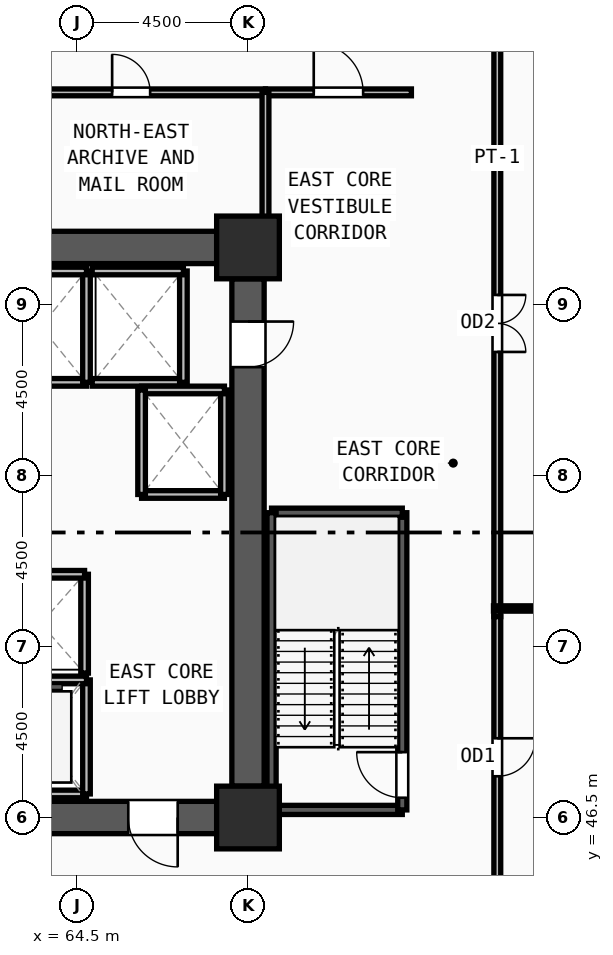
"""IFC4 building model, lengths in metres.
Left out: names, types, materials, properties, quantities, classifications, styles, units other than length and angle.
Written with IfcOpenShell. Run it as: python <this file> out.ifc"""

import sys

from ifc_helpers import new_model, si_unit, direction, frame, frame_2d, origin, origin_2d, place, context, subcontext, project, spatial, rectangle, extrude, source, transform, mapped, element, fill, save


model = new_model("IFC4")
c1 = context("Model", 3, precision=1e-05, world=origin(), true_north=direction((0.0, 1.0)))
c2 = subcontext(c1, "Body", "Model", "MODEL_VIEW")
j1 = project(units=[si_unit("LENGTHUNIT", "METRE"), si_unit("PLANEANGLEUNIT", "RADIAN")], contexts=[c1])
p1 = place(None, origin())
s1 = spatial("IfcSite", under=j1, at=p1, CompositionType="ELEMENT")
p2 = place(p1, origin())
s2 = spatial("IfcBuilding", under=s1, at=p2, CompositionType="ELEMENT")
p3 = place(p2, frame((0.0, 0.0, 28.5)))
s3 = spatial("IfcBuildingStorey", under=s2, at=p3, CompositionType="ELEMENT", Elevation=28.5)
m1 = source(origin(), c2, "Body", "SweptSolid", [
    extrude(rectangle(XDim=1.65, YDim=1.65, at=origin_2d()), origin(), (0.0, 0.0, 1.0), 3.75),
])
for number, where, z_axis, x_axis in (
    (1, (69.0, 46.5, 0.0), (0.0, 0.0, 1.0), (1.0, 0.0, 0.0)),
    (2, (69.0, 61.5, 0.0), (0.0, 0.0, 1.0), (1.0, 0.0, 0.0)),
):
    element("IfcColumn", number, at=place(p3, frame(where, z_axis=z_axis, x_axis=x_axis)), inside=s3, PredefinedType="COLUMN", context=c2, shape_type="MappedRepresentation", body=[
        mapped(m1, transform((0.0, 0.0, 0.0), x_axis=(1.0, 0.0, 0.0), y_axis=(0.0, 1.0, 0.0), z_axis=(0.0, 0.0, 1.0), scale=1.0)),
    ])
p4 = place(p3, frame((60.825, 61.5, 0.0), z_axis=(0.0, 0.0, 1.0), x_axis=(1.0, 0.0, 0.0)))
e3 = element("IfcWall", 3, at=p4, inside=s3, PredefinedType="SHEAR", context=c2, shape_type="SweptSolid", body=[
    extrude(rectangle(XDim=7.35, YDim=0.85, at=frame_2d((3.675, 0.0))), origin(), (0.0, 0.0, 1.0), 3.57),
])
p5 = place(p3, frame((69.0, 60.675, 0.0), z_axis=(0.0, 0.0, 1.0), x_axis=(0.0, -1.0, 0.0)))
e4 = element("IfcWall", 4, at=p5, inside=s3, PredefinedType="SHEAR", context=c2, shape_type="SweptSolid", body=[
    extrude(rectangle(XDim=13.35, YDim=0.85, at=frame_2d((6.675, 0.0))), origin(), (0.0, 0.0, 1.0), 3.57),
])
m2 = source(origin(), c2, "Body", "SweptSolid", [
    extrude(rectangle(XDim=1.2, YDim=2.2, at=frame_2d((0.6, 1.1))), frame((0.0, 0.435, 0.0), z_axis=(0.0, -1.0, 0.0), x_axis=(1.0, 0.0, 0.0)), (0.0, 0.0, 1.0), 0.87),
])
p6 = place(p5, frame((1.125, 0.0, 0.0)))
e5 = element("IfcOpeningElement", 5, at=p6, cuts=e4, PredefinedType="OPENING", context=c2, shape_type="MappedRepresentation", body=[
    mapped(m2, transform((0.0, 0.0, 0.0), x_axis=(1.0, 0.0, 0.0), y_axis=(0.0, 1.0, 0.0), z_axis=(0.0, 0.0, 1.0), scale=1.0)),
])
p7 = place(p3, frame((68.175, 46.5, 0.0), z_axis=(0.0, 0.0, 1.0), x_axis=(-1.0, 0.0, 0.0)))
e6 = element("IfcWall", 6, at=p7, inside=s3, PredefinedType="SHEAR", context=c2, shape_type="SweptSolid", body=[
    extrude(rectangle(XDim=7.35, YDim=0.85, at=frame_2d((3.675, 0.0))), origin(), (0.0, 0.0, 1.0), 3.57),
])
m3 = source(origin(), c2, "Body", "SweptSolid", [
    extrude(rectangle(XDim=1.3, YDim=2.2, at=frame_2d((0.65, 1.1))), frame((0.0, 0.435, 0.0), z_axis=(0.0, -1.0, 0.0), x_axis=(1.0, 0.0, 0.0)), (0.0, 0.0, 1.0), 0.87),
])
p8 = place(p7, frame((1.025, 0.0, 0.0)))
e7 = element("IfcOpeningElement", 7, at=p8, cuts=e6, PredefinedType="OPENING", context=c2, shape_type="MappedRepresentation", body=[
    mapped(m3, transform((0.0, 0.0, 0.0), x_axis=(1.0, 0.0, 0.0), y_axis=(0.0, 1.0, 0.0), z_axis=(0.0, 0.0, 1.0), scale=1.0)),
])
p9 = place(p3, frame((69.62, 46.7, 0.0), z_axis=(0.0, 0.0, 1.0), x_axis=(1.0, 0.0, 0.0)))
e8 = element("IfcWall", 8, at=p9, inside=s3, PredefinedType="SOLIDWALL", context=c2, shape_type="SweptSolid", body=[
    extrude(rectangle(XDim=3.44, YDim=0.24, at=frame_2d((1.72, 0.0))), origin(), (0.0, 0.0, 1.0), 3.57),
])
p10 = place(p3, frame((73.06, 46.7, 0.0), z_axis=(0.0, 0.0, 1.0), x_axis=(0.0, 1.0, 0.0)))
e9 = element("IfcWall", 9, at=p10, inside=s3, PredefinedType="SOLIDWALL", context=c2, shape_type="SweptSolid", body=[
    extrude(rectangle(XDim=7.82, YDim=0.24, at=frame_2d((3.91, 0.0))), origin(), (0.0, 0.0, 1.0), 3.57),
])
m4 = source(origin(), c2, "Body", "SweptSolid", [
    extrude(rectangle(XDim=1.2, YDim=2.2, at=frame_2d((0.6, 1.1))), frame((0.0, 0.13, 0.0), z_axis=(0.0, -1.0, 0.0), x_axis=(1.0, 0.0, 0.0)), (0.0, 0.0, 1.0), 0.26),
])
p11 = place(p10, frame((0.32, 0.0, 0.0)))
e10 = element("IfcOpeningElement", 10, at=p11, cuts=e9, PredefinedType="OPENING", context=c2, shape_type="MappedRepresentation", body=[
    mapped(m4, transform((0.0, 0.0, 0.0), x_axis=(1.0, 0.0, 0.0), y_axis=(0.0, 1.0, 0.0), z_axis=(0.0, 0.0, 1.0), scale=1.0)),
])
p12 = place(p3, frame((73.06, 54.52, 0.0), z_axis=(0.0, 0.0, 1.0), x_axis=(-1.0, 0.0, 0.0)))
e11 = element("IfcWall", 11, at=p12, inside=s3, PredefinedType="SOLIDWALL", context=c2, shape_type="SweptSolid", body=[
    extrude(rectangle(XDim=3.44, YDim=0.24, at=frame_2d((1.72, 0.0))), origin(), (0.0, 0.0, 1.0), 3.57),
])
p13 = place(p3, frame((69.62, 54.52, 0.0), z_axis=(0.0, 0.0, 1.0), x_axis=(0.0, -1.0, 0.0)))
e12 = element("IfcWall", 12, at=p13, inside=s3, PredefinedType="SOLIDWALL", context=c2, shape_type="SweptSolid", body=[
    extrude(rectangle(XDim=7.82, YDim=0.24, at=frame_2d((3.91, 0.0))), origin(), (0.0, 0.0, 1.0), 3.57),
])
p14 = place(p3, frame((62.35, 47.12, 0.0), z_axis=(0.0, 0.0, 1.0), x_axis=(1.0, 0.0, 0.0)))
e13 = element("IfcWall", 13, at=p14, inside=s3, PredefinedType="SOLIDWALL", context=c2, shape_type="SweptSolid", body=[
    extrude(rectangle(XDim=2.4, YDim=0.2, at=frame_2d((1.2, 0.0))), origin(), (0.0, 0.0, 1.0), 3.57),
])
p15 = place(p3, frame((64.75, 47.12, 0.0), z_axis=(0.0, 0.0, 1.0), x_axis=(0.0, 1.0, 0.0)))
e14 = element("IfcWall", 14, at=p15, inside=s3, PredefinedType="SOLIDWALL", context=c2, shape_type="SweptSolid", body=[
    extrude(rectangle(XDim=3.0, YDim=0.2, at=frame_2d((1.5, 0.0))), origin(), (0.0, 0.0, 1.0), 3.57),
])
for number, where, z_axis, x_axis in (
    (15, (64.75, 50.12, 0.0), (0.0, 0.0, 1.0), (-1.0, 0.0, 0.0)),
    (16, (62.35, 57.95, 0.0), (0.0, 0.0, 1.0), (1.0, 0.0, 0.0)),
):
    element("IfcWall", number, at=place(p3, frame(where, z_axis=z_axis, x_axis=x_axis)), inside=s3, PredefinedType="SOLIDWALL", context=c2, shape_type="SweptSolid", body=[
        extrude(rectangle(XDim=2.4, YDim=0.2, at=frame_2d((1.2, 0.0))), origin(), (0.0, 0.0, 1.0), 3.57),
    ])
p16 = place(p3, frame((64.75, 57.95, 0.0), z_axis=(0.0, 0.0, 1.0), x_axis=(0.0, 1.0, 0.0)))
e17 = element("IfcWall", 17, at=p16, inside=s3, PredefinedType="SOLIDWALL", context=c2, shape_type="SweptSolid", body=[
    extrude(rectangle(XDim=2.93, YDim=0.2, at=frame_2d((1.465, 0.0))), origin(), (0.0, 0.0, 1.0), 3.57),
])
p17 = place(p3, frame((64.75, 60.88, 0.0), z_axis=(0.0, 0.0, 1.0), x_axis=(-1.0, 0.0, 0.0)))
e18 = element("IfcWall", 18, at=p17, inside=s3, PredefinedType="SOLIDWALL", context=c2, shape_type="SweptSolid", body=[
    extrude(rectangle(XDim=2.4, YDim=0.2, at=frame_2d((1.2, 0.0))), origin(), (0.0, 0.0, 1.0), 3.57),
])
p18 = place(p3, frame((64.9, 57.95, 0.0), z_axis=(0.0, 0.0, 1.0), x_axis=(1.0, 0.0, 0.0)))
e19 = element("IfcWall", 19, at=p18, inside=s3, PredefinedType="SOLIDWALL", context=c2, shape_type="SweptSolid", body=[
    extrude(rectangle(XDim=2.4, YDim=0.2, at=frame_2d((1.2, 0.0))), origin(), (0.0, 0.0, 1.0), 3.57),
])
p19 = place(p3, frame((67.3, 57.95, 0.0), z_axis=(0.0, 0.0, 1.0), x_axis=(0.0, 1.0, 0.0)))
e20 = element("IfcWall", 20, at=p19, inside=s3, PredefinedType="SOLIDWALL", context=c2, shape_type="SweptSolid", body=[
    extrude(rectangle(XDim=2.93, YDim=0.2, at=frame_2d((1.465, 0.0))), origin(), (0.0, 0.0, 1.0), 3.57),
])
p20 = place(p3, frame((67.3, 60.88, 0.0), z_axis=(0.0, 0.0, 1.0), x_axis=(-1.0, 0.0, 0.0)))
e21 = element("IfcWall", 21, at=p20, inside=s3, PredefinedType="SOLIDWALL", context=c2, shape_type="SweptSolid", body=[
    extrude(rectangle(XDim=2.4, YDim=0.2, at=frame_2d((1.2, 0.0))), origin(), (0.0, 0.0, 1.0), 3.57),
])
p21 = place(p3, frame((66.2, 55.0, 0.0), z_axis=(0.0, 0.0, 1.0), x_axis=(1.0, 0.0, 0.0)))
e22 = element("IfcWall", 22, at=p21, inside=s3, PredefinedType="SOLIDWALL", context=c2, shape_type="SweptSolid", body=[
    extrude(rectangle(XDim=2.18, YDim=0.2, at=frame_2d((1.09, 0.0))), origin(), (0.0, 0.0, 1.0), 3.57),
])
p22 = place(p3, frame((68.38, 55.0, 0.0), z_axis=(0.0, 0.0, 1.0), x_axis=(0.0, 1.0, 0.0)))
e23 = element("IfcWall", 23, at=p22, inside=s3, PredefinedType="SOLIDWALL", context=c2, shape_type="SweptSolid", body=[
    extrude(rectangle(XDim=2.75, YDim=0.2, at=frame_2d((1.375, 0.0))), origin(), (0.0, 0.0, 1.0), 3.57),
])
p23 = place(p3, frame((68.38, 57.75, 0.0), z_axis=(0.0, 0.0, 1.0), x_axis=(-1.0, 0.0, 0.0)))
e24 = element("IfcWall", 24, at=p23, inside=s3, PredefinedType="SOLIDWALL", context=c2, shape_type="SweptSolid", body=[
    extrude(rectangle(XDim=2.18, YDim=0.2, at=frame_2d((1.09, 0.0))), origin(), (0.0, 0.0, 1.0), 3.57),
])
p24 = place(p3, frame((66.2, 57.75, 0.0), z_axis=(0.0, 0.0, 1.0), x_axis=(0.0, -1.0, 0.0)))
e25 = element("IfcWall", 25, at=p24, inside=s3, PredefinedType="SOLIDWALL", context=c2, shape_type="SweptSolid", body=[
    extrude(rectangle(XDim=2.75, YDim=0.2, at=frame_2d((1.375, 0.0))), origin(), (0.0, 0.0, 1.0), 3.57),
])
p25 = place(p3, frame((64.7, 50.3, 0.0), z_axis=(0.0, 0.0, 1.0), x_axis=(0.0, 1.0, 0.0)))
e26 = element("IfcWall", 26, at=p25, inside=s3, PredefinedType="SOLIDWALL", context=c2, shape_type="SweptSolid", body=[
    extrude(rectangle(XDim=2.6, YDim=0.2, at=frame_2d((1.3, 0.0))), origin(), (0.0, 0.0, 1.0), 3.57),
])
p26 = place(p3, frame((64.7, 52.9, 0.0), z_axis=(0.0, 0.0, 1.0), x_axis=(-1.0, 0.0, 0.0)))
e27 = element("IfcWall", 27, at=p26, inside=s3, PredefinedType="SOLIDWALL", context=c2, shape_type="SweptSolid", body=[
    extrude(rectangle(XDim=2.3, YDim=0.2, at=frame_2d((1.15, 0.0))), origin(), (0.0, 0.0, 1.0), 3.57),
])
p27 = place(p3, frame((62.39, 65.58, 0.0), z_axis=(0.0, 0.0, 1.0), x_axis=(1.0, 0.0, 0.0)))
e28 = element("IfcWall", 28, at=p27, inside=s3, PredefinedType="PARTITIONING", context=c2, shape_type="SweptSolid", body=[
    extrude(rectangle(XDim=7.07, YDim=0.18, at=frame_2d((3.535, 0.0))), origin(), (0.0, 0.0, 1.0), 3.57),
])
m5 = source(origin(), c2, "Body", "SweptSolid", [
    extrude(rectangle(XDim=1.0, YDim=2.2, at=frame_2d((0.5, 1.1))), frame((0.0, 0.1, 0.0), z_axis=(0.0, -1.0, 0.0), x_axis=(1.0, 0.0, 0.0)), (0.0, 0.0, 1.0), 0.2),
])
p28 = place(p27, frame((3.035, 0.0, 0.0)))
e29 = element("IfcOpeningElement", 29, at=p28, cuts=e28, PredefinedType="OPENING", context=c2, shape_type="MappedRepresentation", body=[
    mapped(m5, transform((0.0, 0.0, 0.0), x_axis=(1.0, 0.0, 0.0), y_axis=(0.0, 1.0, 0.0), z_axis=(0.0, 0.0, 1.0), scale=1.0)),
])
p29 = place(p3, frame((69.46, 65.58, 0.0), z_axis=(0.0, 0.0, 1.0), x_axis=(1.0, 0.0, 0.0)))
e30 = element("IfcWall", 30, at=p29, inside=s3, PredefinedType="PARTITIONING", context=c2, shape_type="SweptSolid", body=[
    extrude(rectangle(XDim=3.84, YDim=0.18, at=frame_2d((1.92, 0.0))), origin(), (0.0, 0.0, 1.0), 3.57),
])
m6 = source(origin(), c2, "Body", "SweptSolid", [
    extrude(rectangle(XDim=1.3, YDim=2.2, at=frame_2d((0.65, 1.1))), frame((0.0, 0.1, 0.0), z_axis=(0.0, -1.0, 0.0), x_axis=(1.0, 0.0, 0.0)), (0.0, 0.0, 1.0), 0.2),
])
p30 = place(p29, frame((1.27, 0.0, 0.0)))
e31 = element("IfcOpeningElement", 31, at=p30, cuts=e30, PredefinedType="OPENING", context=c2, shape_type="MappedRepresentation", body=[
    mapped(m6, transform((0.0, 0.0, 0.0), x_axis=(1.0, 0.0, 0.0), y_axis=(0.0, 1.0, 0.0), z_axis=(0.0, 0.0, 1.0), scale=1.0)),
])
p31 = place(p3, frame((75.56, 67.215, 0.0), z_axis=(0.0, 0.0, 1.0), x_axis=(0.0, -1.0, 0.0)))
e32 = element("IfcWall", 32, at=p31, inside=s3, PredefinedType="PARTITIONING", context=c2, shape_type="SweptSolid", body=[
    extrude(rectangle(XDim=15.43, YDim=0.18, at=frame_2d((7.715, 0.0))), origin(), (0.0, 0.0, 1.0), 3.57),
])
m7 = source(origin(), c2, "Body", "SweptSolid", [
    extrude(rectangle(XDim=1.5, YDim=2.2, at=frame_2d((0.75, 1.1))), frame((0.0, 0.1, 0.0), z_axis=(0.0, -1.0, 0.0), x_axis=(1.0, 0.0, 0.0)), (0.0, 0.0, 1.0), 0.2),
])
p32 = place(p31, frame((6.965, 0.0, 0.0)))
e33 = element("IfcOpeningElement", 33, at=p32, cuts=e32, PredefinedType="OPENING", context=c2, shape_type="MappedRepresentation", body=[
    mapped(m7, transform((0.0, 0.0, 0.0), x_axis=(1.0, 0.0, 0.0), y_axis=(0.0, 1.0, 0.0), z_axis=(0.0, 0.0, 1.0), scale=1.0)),
])
p33 = place(p3, frame((75.56, 51.785, 0.0), z_axis=(0.0, 0.0, 1.0), x_axis=(0.0, -1.0, 0.0)))
e34 = element("IfcWall", 34, at=p33, inside=s3, PredefinedType="PARTITIONING", context=c2, shape_type="SweptSolid", body=[
    extrude(rectangle(XDim=7.4, YDim=0.18, at=frame_2d((3.7, 0.0))), origin(), (0.0, 0.0, 1.0), 3.57),
])
p34 = place(p33, frame((3.2, 0.0, 0.0)))
e35 = element("IfcOpeningElement", 35, at=p34, cuts=e34, PredefinedType="OPENING", context=c2, shape_type="MappedRepresentation", body=[
    mapped(m5, transform((0.0, 0.0, 0.0), x_axis=(1.0, 0.0, 0.0), y_axis=(0.0, 1.0, 0.0), z_axis=(0.0, 0.0, 1.0), scale=1.0)),
])
p35 = place(p3, frame((69.46, 61.95, 0.0), z_axis=(0.0, 0.0, 1.0), x_axis=(0.0, 1.0, 0.0)))
e36 = element("IfcWall", 36, at=p35, inside=s3, PredefinedType="PARTITIONING", context=c2, shape_type="SweptSolid", body=[
    extrude(rectangle(XDim=3.63, YDim=0.18, at=frame_2d((1.815, 0.0))), origin(), (0.0, 0.0, 1.0), 3.57),
])
p36 = place(p3, frame((75.46, 52.0, 0.0), z_axis=(0.0, 0.0, 1.0), x_axis=(1.0, 0.0, 0.0)))
e37 = element("IfcWall", 37, at=p36, inside=s3, PredefinedType="PARTITIONING", context=c2, shape_type="SweptSolid", body=[
    extrude(rectangle(XDim=16.023, YDim=0.14, at=frame_2d((8.011, 0.0))), origin(), (0.0, 0.0, 1.0), 3.57),
])
m8 = source(origin(), c2, "Body", "SweptSolid", [
    extrude(rectangle(XDim=1.3, YDim=2.2, at=frame_2d((0.65, 1.1))), frame((0.0, 0.025, 0.0), z_axis=(0.0, -1.0, 0.0), x_axis=(1.0, 0.0, 0.0)), (0.0, 0.0, 1.0), 0.05),
])
p37 = place(p8, origin())
e38 = element("IfcDoor", 38, at=p37, inside=s3, OperationType="SINGLE_SWING_LEFT", PredefinedType="DOOR", context=c2, shape_type="MappedRepresentation", body=[
    mapped(m8, transform((0.0, 0.0, 0.0), x_axis=(1.0, 0.0, 0.0), y_axis=(0.0, 1.0, 0.0), z_axis=(0.0, 0.0, 1.0), scale=1.0)),
])
fill(e7, e38)
m9 = source(origin(), c2, "Body", "SweptSolid", [
    extrude(rectangle(XDim=1.2, YDim=2.2, at=frame_2d((0.6, 1.1))), frame((0.0, 0.025, 0.0), z_axis=(0.0, -1.0, 0.0), x_axis=(1.0, 0.0, 0.0)), (0.0, 0.0, 1.0), 0.05),
])
p38 = place(p6, origin())
e39 = element("IfcDoor", 39, at=p38, inside=s3, OperationType="SINGLE_SWING_LEFT", PredefinedType="DOOR", context=c2, shape_type="MappedRepresentation", body=[
    mapped(m9, transform((0.0, 0.0, 0.0), x_axis=(1.0, 0.0, 0.0), y_axis=(0.0, 1.0, 0.0), z_axis=(0.0, 0.0, 1.0), scale=1.0)),
])
fill(e5, e39)
p39 = place(p11, origin())
e40 = element("IfcDoor", 40, at=p39, inside=s3, OperationType="SINGLE_SWING_RIGHT", PredefinedType="DOOR", context=c2, shape_type="MappedRepresentation", body=[
    mapped(m9, transform((0.0, 0.0, 0.0), x_axis=(1.0, 0.0, 0.0), y_axis=(0.0, 1.0, 0.0), z_axis=(0.0, 0.0, 1.0), scale=1.0)),
])
fill(e10, e40)
m10 = source(origin(), c2, "Body", "SweptSolid", [
    extrude(rectangle(XDim=1.0, YDim=2.2, at=frame_2d((0.5, 1.1))), frame((0.0, 0.025, 0.0), z_axis=(0.0, -1.0, 0.0), x_axis=(1.0, 0.0, 0.0)), (0.0, 0.0, 1.0), 0.05),
])
p40 = place(p28, origin())
e41 = element("IfcDoor", 41, at=p40, inside=s3, OperationType="SINGLE_SWING_LEFT", PredefinedType="DOOR", context=c2, shape_type="MappedRepresentation", body=[
    mapped(m10, transform((0.0, 0.0, 0.0), x_axis=(1.0, 0.0, 0.0), y_axis=(0.0, 1.0, 0.0), z_axis=(0.0, 0.0, 1.0), scale=1.0)),
])
fill(e29, e41)
p41 = place(p30, origin())
e42 = element("IfcDoor", 42, at=p41, inside=s3, OperationType="SINGLE_SWING_LEFT", PredefinedType="DOOR", context=c2, shape_type="MappedRepresentation", body=[
    mapped(m8, transform((0.0, 0.0, 0.0), x_axis=(1.0, 0.0, 0.0), y_axis=(0.0, 1.0, 0.0), z_axis=(0.0, 0.0, 1.0), scale=1.0)),
])
fill(e31, e42)
m11 = source(origin(), c2, "Body", "SweptSolid", [
    extrude(rectangle(XDim=1.5, YDim=2.2, at=frame_2d((0.75, 1.1))), frame((0.0, 0.025, 0.0), z_axis=(0.0, -1.0, 0.0), x_axis=(1.0, 0.0, 0.0)), (0.0, 0.0, 1.0), 0.05),
])
p42 = place(p32, origin())
e43 = element("IfcDoor", 43, at=p42, inside=s3, OperationType="DOUBLE_DOOR_SINGLE_SWING", PredefinedType="DOOR", context=c2, shape_type="MappedRepresentation", body=[
    mapped(m11, transform((0.0, 0.0, 0.0), x_axis=(1.0, 0.0, 0.0), y_axis=(0.0, 1.0, 0.0), z_axis=(0.0, 0.0, 1.0), scale=1.0)),
])
fill(e33, e43)
p43 = place(p34, origin())
e44 = element("IfcDoor", 44, at=p43, inside=s3, OperationType="SINGLE_SWING_LEFT", PredefinedType="DOOR", context=c2, shape_type="MappedRepresentation", body=[
    mapped(m10, transform((0.0, 0.0, 0.0), x_axis=(1.0, 0.0, 0.0), y_axis=(0.0, 1.0, 0.0), z_axis=(0.0, 0.0, 1.0), scale=1.0)),
])
fill(e35, e44)
save(model, sys.argv[1])
